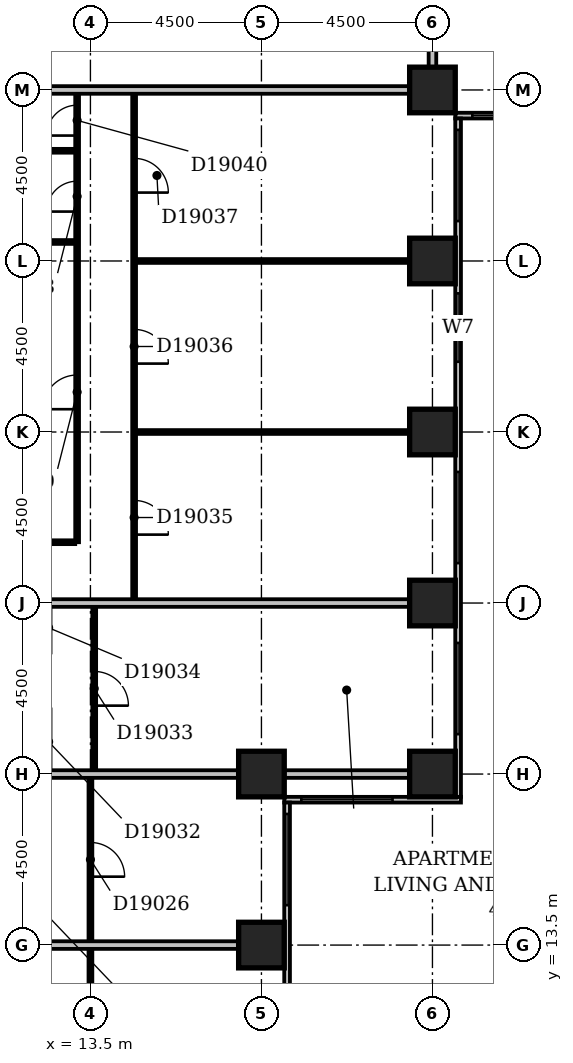
"""IFC4 building model, lengths in metres.
Left out: names, types, materials, properties, quantities, classifications, styles, units other than length and angle.
Written with IfcOpenShell. Run it as: python <this file> out.ifc"""

import sys

from ifc_helpers import new_model, si_unit, direction, frame, frame_2d, origin, origin_2d, place, context, subcontext, project, spatial, rectangle, extrude, element, fill, save


model = new_model("IFC4")
c1 = context("Model", 3, precision=1e-05, world=origin(), true_north=direction((0.0, 1.0)))
c2 = subcontext(c1, "Body", "Model", "MODEL_VIEW")
j1 = project(units=[si_unit("LENGTHUNIT", "METRE"), si_unit("PLANEANGLEUNIT", "RADIAN")], contexts=[c1])
p1 = place(None, origin())
s1 = spatial("IfcSite", under=j1, at=p1, CompositionType="ELEMENT")
p2 = place(p1, origin())
s2 = spatial("IfcBuilding", under=s1, at=p2, CompositionType="ELEMENT")
p3 = place(p2, frame((0.0, 0.0, 79.4)))
s3 = spatial("IfcBuildingStorey", under=s2, at=p3, CompositionType="ELEMENT", Elevation=79.4)
for number, where, z_axis, x_axis in (
    (1, (18.0, 13.5, -0.3), (0.0, 0.0, 1.0), (1.0, 0.0, 0.0)),
    (2, (18.0, 18.0, -0.3), (0.0, 0.0, 1.0), (1.0, 0.0, 0.0)),
    (3, (22.5, 18.0, -0.3), (0.0, 0.0, 1.0), (1.0, 0.0, 0.0)),
    (4, (22.5, 22.5, -0.3), (0.0, 0.0, 1.0), (1.0, 0.0, 0.0)),
    (5, (22.5, 27.0, -0.3), (0.0, 0.0, 1.0), (1.0, 0.0, 0.0)),
    (6, (22.5, 31.5, -0.3), (0.0, 0.0, 1.0), (1.0, 0.0, 0.0)),
    (7, (22.5, 36.0, -0.3), (0.0, 0.0, 1.0), (1.0, 0.0, 0.0)),
):
    element("IfcColumn", number, at=place(p3, frame(where, z_axis=z_axis, x_axis=x_axis)), inside=s3, PredefinedType="COLUMN", context=c2, shape_type="SweptSolid", body=[
        extrude(rectangle(XDim=1.2, YDim=1.2, at=origin_2d()), origin(), (0.0, 0.0, 1.0), 3.6),
    ])
p4 = place(p3, frame((18.675, 8.4, 0.0), z_axis=(0.0, 0.0, 1.0), x_axis=(0.0, 1.0, 0.0)))
e8 = element("IfcWall", 8, at=p4, inside=s3, PredefinedType="STANDARD", context=c2, shape_type="SweptSolid", body=[
    extrude(rectangle(XDim=8.85, YDim=0.15, at=frame_2d((4.425, 0.0))), origin(), (0.0, 0.0, 1.0), 2.7),
])
p5 = place(p4, frame((1.65, 0.0, 0.6)))
e9 = element("IfcOpeningElement", 9, at=p5, cuts=e8, PredefinedType="OPENING", context=c2, shape_type="SweptSolid", body=[
    extrude(rectangle(XDim=2.4, YDim=1.8, at=frame_2d((1.2, 0.9))), frame((0.0, 0.087, 0.0), z_axis=(0.0, -1.0, 0.0), x_axis=(1.0, 0.0, 0.0)), (0.0, 0.0, 1.0), 0.174),
])
p6 = place(p4, frame((6.15, 0.0, 0.6)))
e10 = element("IfcOpeningElement", 10, at=p6, cuts=e8, PredefinedType="OPENING", context=c2, shape_type="SweptSolid", body=[
    extrude(rectangle(XDim=2.4, YDim=1.8, at=frame_2d((1.2, 0.9))), frame((0.0, 0.087, 0.0), z_axis=(0.0, -1.0, 0.0), x_axis=(1.0, 0.0, 0.0)), (0.0, 0.0, 1.0), 0.174),
])
p7 = place(p3, frame((18.6, 17.325, 0.0), z_axis=(0.0, 0.0, 1.0), x_axis=(1.0, 0.0, 0.0)))
e11 = element("IfcWall", 11, at=p7, inside=s3, PredefinedType="STANDARD", context=c2, shape_type="SweptSolid", body=[
    extrude(rectangle(XDim=4.65, YDim=0.15, at=frame_2d((2.325, 0.0))), origin(), (0.0, 0.0, 1.0), 2.7),
])
p8 = place(p7, frame((0.45, 0.0, 0.6)))
e12 = element("IfcOpeningElement", 12, at=p8, cuts=e11, PredefinedType="OPENING", context=c2, shape_type="SweptSolid", body=[
    extrude(rectangle(XDim=2.4, YDim=1.8, at=frame_2d((1.2, 0.9))), frame((0.0, 0.087, 0.0), z_axis=(0.0, -1.0, 0.0), x_axis=(1.0, 0.0, 0.0)), (0.0, 0.0, 1.0), 0.174),
])
p9 = place(p3, frame((23.175, 17.4, 0.0), z_axis=(0.0, 0.0, 1.0), x_axis=(0.0, 1.0, 0.0)))
e13 = element("IfcWall", 13, at=p9, inside=s3, PredefinedType="STANDARD", context=c2, shape_type="SweptSolid", body=[
    extrude(rectangle(XDim=17.85, YDim=0.15, at=frame_2d((8.925, 0.0))), origin(), (0.0, 0.0, 1.0), 2.7),
])
p10 = place(p9, frame((1.65, 0.0, 0.6)))
e14 = element("IfcOpeningElement", 14, at=p10, cuts=e13, PredefinedType="OPENING", context=c2, shape_type="SweptSolid", body=[
    extrude(rectangle(XDim=2.4, YDim=1.8, at=frame_2d((1.2, 0.9))), frame((0.0, 0.087, 0.0), z_axis=(0.0, -1.0, 0.0), x_axis=(1.0, 0.0, 0.0)), (0.0, 0.0, 1.0), 0.174),
])
p11 = place(p9, frame((6.15, 0.0, 0.6)))
e15 = element("IfcOpeningElement", 15, at=p11, cuts=e13, PredefinedType="OPENING", context=c2, shape_type="SweptSolid", body=[
    extrude(rectangle(XDim=2.4, YDim=1.8, at=frame_2d((1.2, 0.9))), frame((0.0, 0.087, 0.0), z_axis=(0.0, -1.0, 0.0), x_axis=(1.0, 0.0, 0.0)), (0.0, 0.0, 1.0), 0.174),
])
p12 = place(p9, frame((11.448, 0.0, 0.6)))
e16 = element("IfcOpeningElement", 16, at=p12, cuts=e13, PredefinedType="OPENING", context=c2, shape_type="SweptSolid", body=[
    extrude(rectangle(XDim=1.8, YDim=1.8, at=frame_2d((0.9, 0.9))), frame((0.0, 0.087, 0.0), z_axis=(0.0, -1.0, 0.0), x_axis=(1.0, 0.0, 0.0)), (0.0, 0.0, 1.0), 0.174),
])
p13 = place(p9, frame((15.15, 0.0, 0.6)))
e17 = element("IfcOpeningElement", 17, at=p13, cuts=e13, PredefinedType="OPENING", context=c2, shape_type="SweptSolid", body=[
    extrude(rectangle(XDim=2.4, YDim=1.8, at=frame_2d((1.2, 0.9))), frame((0.0, 0.087, 0.0), z_axis=(0.0, -1.0, 0.0), x_axis=(1.0, 0.0, 0.0)), (0.0, 0.0, 1.0), 0.174),
])
p14 = place(p3, frame((23.1, 35.325, 0.0), z_axis=(0.0, 0.0, 1.0), x_axis=(1.0, 0.0, 0.0)))
e18 = element("IfcWall", 18, at=p14, inside=s3, PredefinedType="STANDARD", context=c2, shape_type="SweptSolid", body=[
    extrude(rectangle(XDim=45.15, YDim=0.15, at=frame_2d((22.575, 0.0))), origin(), (0.0, 0.0, 1.0), 2.7),
])
p15 = place(p14, frame((0.45, 0.0, 0.6)))
e19 = element("IfcOpeningElement", 19, at=p15, cuts=e18, PredefinedType="OPENING", context=c2, shape_type="SweptSolid", body=[
    extrude(rectangle(XDim=2.4, YDim=1.8, at=frame_2d((1.2, 0.9))), frame((0.0, 0.087, 0.0), z_axis=(0.0, -1.0, 0.0), x_axis=(1.0, 0.0, 0.0)), (0.0, 0.0, 1.0), 0.174),
])
p16 = place(p14, frame((4.793, 0.0, 0.6)))
e20 = element("IfcOpeningElement", 20, at=p16, cuts=e18, PredefinedType="OPENING", context=c2, shape_type="SweptSolid", body=[
    extrude(rectangle(XDim=1.8, YDim=1.8, at=frame_2d((0.9, 0.9))), frame((0.0, 0.087, 0.0), z_axis=(0.0, -1.0, 0.0), x_axis=(1.0, 0.0, 0.0)), (0.0, 0.0, 1.0), 0.174),
])
p17 = place(p14, frame((9.45, 0.0, 0.6)))
e21 = element("IfcOpeningElement", 21, at=p17, cuts=e18, PredefinedType="OPENING", context=c2, shape_type="SweptSolid", body=[
    extrude(rectangle(XDim=2.4, YDim=1.8, at=frame_2d((1.2, 0.9))), frame((0.0, 0.087, 0.0), z_axis=(0.0, -1.0, 0.0), x_axis=(1.0, 0.0, 0.0)), (0.0, 0.0, 1.0), 0.174),
])
p18 = place(p14, frame((13.95, 0.0, 0.6)))
e22 = element("IfcOpeningElement", 22, at=p18, cuts=e18, PredefinedType="OPENING", context=c2, shape_type="SweptSolid", body=[
    extrude(rectangle(XDim=2.4, YDim=1.8, at=frame_2d((1.2, 0.9))), frame((0.0, 0.087, 0.0), z_axis=(0.0, -1.0, 0.0), x_axis=(1.0, 0.0, 0.0)), (0.0, 0.0, 1.0), 0.174),
])
p19 = place(p14, frame((19.597, 0.0, 0.6)))
e23 = element("IfcOpeningElement", 23, at=p19, cuts=e18, PredefinedType="OPENING", context=c2, shape_type="SweptSolid", body=[
    extrude(rectangle(XDim=1.5, YDim=1.8, at=frame_2d((0.75, 0.9))), frame((0.0, 0.087, 0.0), z_axis=(0.0, -1.0, 0.0), x_axis=(1.0, 0.0, 0.0)), (0.0, 0.0, 1.0), 0.174),
])
p20 = place(p14, frame((22.95, 0.0, 0.6)))
e24 = element("IfcOpeningElement", 24, at=p20, cuts=e18, PredefinedType="OPENING", context=c2, shape_type="SweptSolid", body=[
    extrude(rectangle(XDim=2.4, YDim=1.8, at=frame_2d((1.2, 0.9))), frame((0.0, 0.087, 0.0), z_axis=(0.0, -1.0, 0.0), x_axis=(1.0, 0.0, 0.0)), (0.0, 0.0, 1.0), 0.174),
])
p21 = place(p14, frame((27.45, 0.0, 0.6)))
e25 = element("IfcOpeningElement", 25, at=p21, cuts=e18, PredefinedType="OPENING", context=c2, shape_type="SweptSolid", body=[
    extrude(rectangle(XDim=2.4, YDim=1.8, at=frame_2d((1.2, 0.9))), frame((0.0, 0.087, 0.0), z_axis=(0.0, -1.0, 0.0), x_axis=(1.0, 0.0, 0.0)), (0.0, 0.0, 1.0), 0.174),
])
p22 = place(p14, frame((31.95, 0.0, 0.6)))
e26 = element("IfcOpeningElement", 26, at=p22, cuts=e18, PredefinedType="OPENING", context=c2, shape_type="SweptSolid", body=[
    extrude(rectangle(XDim=2.4, YDim=1.8, at=frame_2d((1.2, 0.9))), frame((0.0, 0.087, 0.0), z_axis=(0.0, -1.0, 0.0), x_axis=(1.0, 0.0, 0.0)), (0.0, 0.0, 1.0), 0.174),
])
p23 = place(p14, frame((37.861, 0.0, 0.6)))
e27 = element("IfcOpeningElement", 27, at=p23, cuts=e18, PredefinedType="OPENING", context=c2, shape_type="SweptSolid", body=[
    extrude(rectangle(XDim=1.2, YDim=1.8, at=frame_2d((0.6, 0.9))), frame((0.0, 0.087, 0.0), z_axis=(0.0, -1.0, 0.0), x_axis=(1.0, 0.0, 0.0)), (0.0, 0.0, 1.0), 0.174),
])
p24 = place(p14, frame((40.95, 0.0, 0.6)))
e28 = element("IfcOpeningElement", 28, at=p24, cuts=e18, PredefinedType="OPENING", context=c2, shape_type="SweptSolid", body=[
    extrude(rectangle(XDim=2.4, YDim=1.8, at=frame_2d((1.2, 0.9))), frame((0.0, 0.087, 0.0), z_axis=(0.0, -1.0, 0.0), x_axis=(1.0, 0.0, 0.0)), (0.0, 0.0, 1.0), 0.174),
])
p25 = place(p3, frame((13.5, 9.6, 0.0), z_axis=(0.0, 0.0, 1.0), x_axis=(0.0, 1.0, 0.0)))
e29 = element("IfcWall", 29, at=p25, inside=s3, PredefinedType="PARTITIONING", context=c2, shape_type="SweptSolid", body=[
    extrude(rectangle(XDim=8.3, YDim=0.1, at=frame_2d((4.15, 0.0))), origin(), (0.0, 0.0, 1.0), 3.3),
])
p26 = place(p25, frame((5.7, 0.0, 0.0)))
e30 = element("IfcOpeningElement", 30, at=p26, cuts=e29, PredefinedType="OPENING", context=c2, shape_type="SweptSolid", body=[
    extrude(rectangle(XDim=0.9, YDim=2.1, at=frame_2d((0.45, 1.05))), frame((0.0, 0.062, 0.0), z_axis=(0.0, -1.0, 0.0), x_axis=(1.0, 0.0, 0.0)), (0.0, 0.0, 1.0), 0.124),
])
p27 = place(p25, frame((1.2, 0.0, 0.0)))
e31 = element("IfcOpeningElement", 31, at=p27, cuts=e29, PredefinedType="OPENING", context=c2, shape_type="SweptSolid", body=[
    extrude(rectangle(XDim=0.9, YDim=2.1, at=frame_2d((0.45, 1.05))), frame((0.0, 0.062, 0.0), z_axis=(0.0, -1.0, 0.0), x_axis=(1.0, 0.0, 0.0)), (0.0, 0.0, 1.0), 0.124),
])
p28 = place(p3, frame((9.1, 13.5, 0.0), z_axis=(0.0, 0.0, 1.0), x_axis=(1.0, 0.0, 0.0)))
e32 = element("IfcWall", 32, at=p28, inside=s3, PredefinedType="PARTITIONING", context=c2, shape_type="SweptSolid", body=[
    extrude(rectangle(XDim=8.3, YDim=0.2, at=frame_2d((4.15, 0.0))), origin(), (0.0, 0.0, 1.0), 3.3),
])
p29 = place(p3, frame((9.1, 18.0, 0.0), z_axis=(0.0, 0.0, 1.0), x_axis=(1.0, 0.0, 0.0)))
e33 = element("IfcWall", 33, at=p29, inside=s3, PredefinedType="PARTITIONING", context=c2, shape_type="SweptSolid", body=[
    extrude(rectangle(XDim=8.3, YDim=0.2, at=frame_2d((4.15, 0.0))), origin(), (0.0, 0.0, 1.0), 2.6),
])
p30 = place(p3, frame((18.6, 18.0, 0.0), z_axis=(0.0, 0.0, 1.0), x_axis=(1.0, 0.0, 0.0)))
e34 = element("IfcWall", 34, at=p30, inside=s3, PredefinedType="PARTITIONING", context=c2, shape_type="SweptSolid", body=[
    extrude(rectangle(XDim=3.3, YDim=0.2, at=frame_2d((1.65, 0.0))), origin(), (0.0, 0.0, 1.0), 2.7),
])
p31 = place(p3, frame((13.6, 18.1, 0.0), z_axis=(0.0, 0.0, 1.0), x_axis=(0.0, 1.0, 0.0)))
e35 = element("IfcWall", 35, at=p31, inside=s3, PredefinedType="PARTITIONING", context=c2, shape_type="SweptSolid", body=[
    extrude(rectangle(XDim=4.3, YDim=0.1, at=frame_2d((2.15, 0.0))), origin(), (0.0, 0.0, 1.0), 3.3),
])
p32 = place(p31, frame((1.7, 0.0, 0.0)))
e36 = element("IfcOpeningElement", 36, at=p32, cuts=e35, PredefinedType="OPENING", context=c2, shape_type="SweptSolid", body=[
    extrude(rectangle(XDim=0.9, YDim=2.1, at=frame_2d((0.45, 1.05))), frame((0.0, 0.062, 0.0), z_axis=(0.0, -1.0, 0.0), x_axis=(1.0, 0.0, 0.0)), (0.0, 0.0, 1.0), 0.124),
])
p33 = place(p3, frame((9.1, 22.5, 0.0), z_axis=(0.0, 0.0, 1.0), x_axis=(1.0, 0.0, 0.0)))
e37 = element("IfcWall", 37, at=p33, inside=s3, PredefinedType="PARTITIONING", context=c2, shape_type="SweptSolid", body=[
    extrude(rectangle(XDim=12.8, YDim=0.2, at=frame_2d((6.4, 0.0))), origin(), (0.0, 0.0, 1.0), 3.3),
])
p34 = place(p3, frame((14.65, 22.6, 0.0), z_axis=(0.0, 0.0, 1.0), x_axis=(0.0, 1.0, 0.0)))
e38 = element("IfcWall", 38, at=p34, inside=s3, PredefinedType="PARTITIONING", context=c2, shape_type="SweptSolid", body=[
    extrude(rectangle(XDim=13.3, YDim=0.1, at=frame_2d((6.65, 0.0))), origin(), (0.0, 0.0, 1.0), 3.3),
])
p35 = place(p34, frame((1.7, 0.0, 0.0)))
e39 = element("IfcOpeningElement", 39, at=p35, cuts=e38, PredefinedType="OPENING", context=c2, shape_type="SweptSolid", body=[
    extrude(rectangle(XDim=0.9, YDim=2.1, at=frame_2d((0.45, 1.05))), frame((0.0, 0.062, 0.0), z_axis=(0.0, -1.0, 0.0), x_axis=(1.0, 0.0, 0.0)), (0.0, 0.0, 1.0), 0.124),
])
p36 = place(p34, frame((6.2, 0.0, 0.0)))
e40 = element("IfcOpeningElement", 40, at=p36, cuts=e38, PredefinedType="OPENING", context=c2, shape_type="SweptSolid", body=[
    extrude(rectangle(XDim=0.9, YDim=2.1, at=frame_2d((0.45, 1.05))), frame((0.0, 0.062, 0.0), z_axis=(0.0, -1.0, 0.0), x_axis=(1.0, 0.0, 0.0)), (0.0, 0.0, 1.0), 0.124),
])
p37 = place(p34, frame((10.7, 0.0, 0.0)))
e41 = element("IfcOpeningElement", 41, at=p37, cuts=e38, PredefinedType="OPENING", context=c2, shape_type="SweptSolid", body=[
    extrude(rectangle(XDim=0.9, YDim=2.1, at=frame_2d((0.45, 1.05))), frame((0.0, 0.062, 0.0), z_axis=(0.0, -1.0, 0.0), x_axis=(1.0, 0.0, 0.0)), (0.0, 0.0, 1.0), 0.124),
])
p38 = place(p3, frame((9.1, 24.1, 0.0), z_axis=(0.0, 0.0, 1.0), x_axis=(1.0, 0.0, 0.0)))
e42 = element("IfcWall", 42, at=p38, inside=s3, PredefinedType="PARTITIONING", context=c2, shape_type="SweptSolid", body=[
    extrude(rectangle(XDim=4.0, YDim=0.1, at=frame_2d((2.0, 0.0))), origin(), (0.0, 0.0, 1.0), 3.3),
])
p39 = place(p3, frame((13.15, 24.1, 0.0), z_axis=(0.0, 0.0, 1.0), x_axis=(0.0, 1.0, 0.0)))
e43 = element("IfcWall", 43, at=p39, inside=s3, PredefinedType="PARTITIONING", context=c2, shape_type="SweptSolid", body=[
    extrude(rectangle(XDim=11.8, YDim=0.1, at=frame_2d((5.9, 0.0))), origin(), (0.0, 0.0, 1.0), 3.3),
])
p40 = place(p39, frame((8.7, 0.0, 0.0)))
e44 = element("IfcOpeningElement", 44, at=p40, cuts=e43, PredefinedType="OPENING", context=c2, shape_type="SweptSolid", body=[
    extrude(rectangle(XDim=0.8, YDim=2.1, at=frame_2d((0.4, 1.05))), frame((0.0, 0.062, 0.0), z_axis=(0.0, -1.0, 0.0), x_axis=(1.0, 0.0, 0.0)), (0.0, 0.0, 1.0), 0.124),
])
p41 = place(p39, frame((3.5, 0.0, 0.0)))
e45 = element("IfcOpeningElement", 45, at=p41, cuts=e43, PredefinedType="OPENING", context=c2, shape_type="SweptSolid", body=[
    extrude(rectangle(XDim=0.9, YDim=2.1, at=frame_2d((0.45, 1.05))), frame((0.0, 0.062, 0.0), z_axis=(0.0, -1.0, 0.0), x_axis=(1.0, 0.0, 0.0)), (0.0, 0.0, 1.0), 0.124),
])
p42 = place(p39, frame((10.7, 0.0, 0.0)))
e46 = element("IfcOpeningElement", 46, at=p42, cuts=e43, PredefinedType="OPENING", context=c2, shape_type="SweptSolid", body=[
    extrude(rectangle(XDim=0.8, YDim=2.1, at=frame_2d((0.4, 1.05))), frame((0.0, 0.062, 0.0), z_axis=(0.0, -1.0, 0.0), x_axis=(1.0, 0.0, 0.0)), (0.0, 0.0, 1.0), 0.124),
])
p43 = place(p3, frame((14.7, 27.0, 0.0), z_axis=(0.0, 0.0, 1.0), x_axis=(1.0, 0.0, 0.0)))
e47 = element("IfcWall", 47, at=p43, inside=s3, PredefinedType="PARTITIONING", context=c2, shape_type="SweptSolid", body=[
    extrude(rectangle(XDim=7.2, YDim=0.1, at=frame_2d((3.6, 0.0))), origin(), (0.0, 0.0, 1.0), 2.7),
])
p44 = place(p3, frame((14.7, 31.5, 0.0), z_axis=(0.0, 0.0, 1.0), x_axis=(1.0, 0.0, 0.0)))
e48 = element("IfcWall", 48, at=p44, inside=s3, PredefinedType="PARTITIONING", context=c2, shape_type="SweptSolid", body=[
    extrude(rectangle(XDim=7.2, YDim=0.1, at=frame_2d((3.6, 0.0))), origin(), (0.0, 0.0, 1.0), 3.3),
])
for number, where, z_axis, x_axis in (
    (49, (9.1, 32.0, 0.0), (0.0, 0.0, 1.0), (1.0, 0.0, 0.0)),
    (50, (9.1, 34.4, 0.0), (0.0, 0.0, 1.0), (1.0, 0.0, 0.0)),
):
    element("IfcWall", number, at=place(p3, frame(where, z_axis=z_axis, x_axis=x_axis)), inside=s3, PredefinedType="PLUMBINGWALL", context=c2, shape_type="SweptSolid", body=[
        extrude(rectangle(XDim=4.0, YDim=0.1, at=frame_2d((2.0, 0.0))), origin(), (0.0, 0.0, 1.0), 3.3),
    ])
p45 = place(p3, frame((9.1, 36.0, 0.0), z_axis=(0.0, 0.0, 1.0), x_axis=(1.0, 0.0, 0.0)))
e51 = element("IfcWall", 51, at=p45, inside=s3, PredefinedType="PARTITIONING", context=c2, shape_type="SweptSolid", body=[
    extrude(rectangle(XDim=12.8, YDim=0.2, at=frame_2d((6.4, 0.0))), origin(), (0.0, 0.0, 1.0), 2.4),
])
p46 = place(p3, frame((22.5, 36.6, 0.0), z_axis=(0.0, 0.0, 1.0), x_axis=(0.0, 1.0, 0.0)))
e52 = element("IfcWall", 52, at=p46, inside=s3, PredefinedType="PARTITIONING", context=c2, shape_type="SweptSolid", body=[
    extrude(rectangle(XDim=12.8, YDim=0.2, at=frame_2d((6.4, 0.0))), origin(), (0.0, 0.0, 1.0), 3.3),
])
p47 = place(p6, origin())
e53 = element("IfcWindow", 53, at=p47, inside=s3, PartitioningType="SINGLE_PANEL", PredefinedType="WINDOW", context=c2, shape_type="SweptSolid", body=[
    extrude(rectangle(XDim=2.4, YDim=1.8, at=frame_2d((1.2, 0.9))), frame((0.0, 0.03, 0.0), z_axis=(0.0, -1.0, 0.0), x_axis=(1.0, 0.0, 0.0)), (0.0, 0.0, 1.0), 0.06),
])
fill(e10, e53)
p48 = place(p8, origin())
e54 = element("IfcWindow", 54, at=p48, inside=s3, PartitioningType="SINGLE_PANEL", PredefinedType="WINDOW", context=c2, shape_type="SweptSolid", body=[
    extrude(rectangle(XDim=2.4, YDim=1.8, at=frame_2d((1.2, 0.9))), frame((0.0, 0.03, 0.0), z_axis=(0.0, -1.0, 0.0), x_axis=(1.0, 0.0, 0.0)), (0.0, 0.0, 1.0), 0.06),
])
fill(e12, e54)
p49 = place(p10, origin())
e55 = element("IfcWindow", 55, at=p49, inside=s3, PartitioningType="SINGLE_PANEL", PredefinedType="WINDOW", context=c2, shape_type="SweptSolid", body=[
    extrude(rectangle(XDim=2.4, YDim=1.8, at=frame_2d((1.2, 0.9))), frame((0.0, 0.03, 0.0), z_axis=(0.0, -1.0, 0.0), x_axis=(1.0, 0.0, 0.0)), (0.0, 0.0, 1.0), 0.06),
])
fill(e14, e55)
p50 = place(p11, origin())
e56 = element("IfcWindow", 56, at=p50, inside=s3, PartitioningType="SINGLE_PANEL", PredefinedType="WINDOW", context=c2, shape_type="SweptSolid", body=[
    extrude(rectangle(XDim=2.4, YDim=1.8, at=frame_2d((1.2, 0.9))), frame((0.0, 0.03, 0.0), z_axis=(0.0, -1.0, 0.0), x_axis=(1.0, 0.0, 0.0)), (0.0, 0.0, 1.0), 0.06),
])
fill(e15, e56)
p51 = place(p12, origin())
e57 = element("IfcWindow", 57, at=p51, inside=s3, PartitioningType="SINGLE_PANEL", PredefinedType="WINDOW", context=c2, shape_type="SweptSolid", body=[
    extrude(rectangle(XDim=1.8, YDim=1.8, at=frame_2d((0.9, 0.9))), frame((0.0, 0.03, 0.0), z_axis=(0.0, -1.0, 0.0), x_axis=(1.0, 0.0, 0.0)), (0.0, 0.0, 1.0), 0.06),
])
fill(e16, e57)
p52 = place(p13, origin())
e58 = element("IfcWindow", 58, at=p52, inside=s3, PartitioningType="SINGLE_PANEL", PredefinedType="WINDOW", context=c2, shape_type="SweptSolid", body=[
    extrude(rectangle(XDim=2.4, YDim=1.8, at=frame_2d((1.2, 0.9))), frame((0.0, 0.03, 0.0), z_axis=(0.0, -1.0, 0.0), x_axis=(1.0, 0.0, 0.0)), (0.0, 0.0, 1.0), 0.06),
])
fill(e17, e58)
p53 = place(p15, origin())
e59 = element("IfcWindow", 59, at=p53, inside=s3, PartitioningType="SINGLE_PANEL", PredefinedType="WINDOW", context=c2, shape_type="SweptSolid", body=[
    extrude(rectangle(XDim=2.4, YDim=1.8, at=frame_2d((1.2, 0.9))), frame((0.0, 0.03, 0.0), z_axis=(0.0, -1.0, 0.0), x_axis=(1.0, 0.0, 0.0)), (0.0, 0.0, 1.0), 0.06),
])
fill(e19, e59)
p54 = place(p26, frame((0.9, 0.0, 0.0), z_axis=(0.0, 0.0, 1.0), x_axis=(-1.0, 0.0, 0.0)))
e60 = element("IfcDoor", 60, at=p54, inside=s3, OperationType="SINGLE_SWING_RIGHT", PredefinedType="DOOR", context=c2, shape_type="SweptSolid", body=[
    extrude(rectangle(XDim=0.9, YDim=2.1, at=frame_2d((0.45, 1.05))), frame((0.0, 0.025, 0.0), z_axis=(0.0, -1.0, 0.0), x_axis=(1.0, 0.0, 0.0)), (0.0, 0.0, 1.0), 0.05),
])
fill(e30, e60)
p55 = place(p32, frame((0.9, 0.0, 0.0), z_axis=(0.0, 0.0, 1.0), x_axis=(-1.0, 0.0, 0.0)))
e61 = element("IfcDoor", 61, at=p55, inside=s3, OperationType="SINGLE_SWING_RIGHT", PredefinedType="DOOR", context=c2, shape_type="SweptSolid", body=[
    extrude(rectangle(XDim=0.9, YDim=2.1, at=frame_2d((0.45, 1.05))), frame((0.0, 0.025, 0.0), z_axis=(0.0, -1.0, 0.0), x_axis=(1.0, 0.0, 0.0)), (0.0, 0.0, 1.0), 0.05),
])
fill(e36, e61)
p56 = place(p35, frame((0.9, 0.0, 0.0), z_axis=(0.0, 0.0, 1.0), x_axis=(-1.0, 0.0, 0.0)))
e62 = element("IfcDoor", 62, at=p56, inside=s3, OperationType="SINGLE_SWING_RIGHT", PredefinedType="DOOR", context=c2, shape_type="SweptSolid", body=[
    extrude(rectangle(XDim=0.9, YDim=2.1, at=frame_2d((0.45, 1.05))), frame((0.0, 0.025, 0.0), z_axis=(0.0, -1.0, 0.0), x_axis=(1.0, 0.0, 0.0)), (0.0, 0.0, 1.0), 0.05),
])
fill(e39, e62)
p57 = place(p36, frame((0.9, 0.0, 0.0), z_axis=(0.0, 0.0, 1.0), x_axis=(-1.0, 0.0, 0.0)))
e63 = element("IfcDoor", 63, at=p57, inside=s3, OperationType="SINGLE_SWING_RIGHT", PredefinedType="DOOR", context=c2, shape_type="SweptSolid", body=[
    extrude(rectangle(XDim=0.9, YDim=2.1, at=frame_2d((0.45, 1.05))), frame((0.0, 0.025, 0.0), z_axis=(0.0, -1.0, 0.0), x_axis=(1.0, 0.0, 0.0)), (0.0, 0.0, 1.0), 0.05),
])
fill(e40, e63)
p58 = place(p37, frame((0.9, 0.0, 0.0), z_axis=(0.0, 0.0, 1.0), x_axis=(-1.0, 0.0, 0.0)))
e64 = element("IfcDoor", 64, at=p58, inside=s3, OperationType="SINGLE_SWING_RIGHT", PredefinedType="DOOR", context=c2, shape_type="SweptSolid", body=[
    extrude(rectangle(XDim=0.9, YDim=2.1, at=frame_2d((0.45, 1.05))), frame((0.0, 0.025, 0.0), z_axis=(0.0, -1.0, 0.0), x_axis=(1.0, 0.0, 0.0)), (0.0, 0.0, 1.0), 0.05),
])
fill(e41, e64)
p59 = place(p40, origin())
e65 = element("IfcDoor", 65, at=p59, inside=s3, OperationType="SINGLE_SWING_LEFT", PredefinedType="DOOR", context=c2, shape_type="SweptSolid", body=[
    extrude(rectangle(XDim=0.8, YDim=2.1, at=frame_2d((0.4, 1.05))), frame((0.0, 0.025, 0.0), z_axis=(0.0, -1.0, 0.0), x_axis=(1.0, 0.0, 0.0)), (0.0, 0.0, 1.0), 0.05),
])
fill(e44, e65)
p60 = place(p41, origin())
e66 = element("IfcDoor", 66, at=p60, inside=s3, OperationType="SINGLE_SWING_LEFT", PredefinedType="DOOR", context=c2, shape_type="SweptSolid", body=[
    extrude(rectangle(XDim=0.9, YDim=2.1, at=frame_2d((0.45, 1.05))), frame((0.0, 0.025, 0.0), z_axis=(0.0, -1.0, 0.0), x_axis=(1.0, 0.0, 0.0)), (0.0, 0.0, 1.0), 0.05),
])
fill(e45, e66)
p61 = place(p42, origin())
e67 = element("IfcDoor", 67, at=p61, inside=s3, OperationType="SINGLE_SWING_LEFT", PredefinedType="DOOR", context=c2, shape_type="SweptSolid", body=[
    extrude(rectangle(XDim=0.8, YDim=2.1, at=frame_2d((0.4, 1.05))), frame((0.0, 0.025, 0.0), z_axis=(0.0, -1.0, 0.0), x_axis=(1.0, 0.0, 0.0)), (0.0, 0.0, 1.0), 0.05),
])
fill(e46, e67)
save(model, sys.argv[1])
